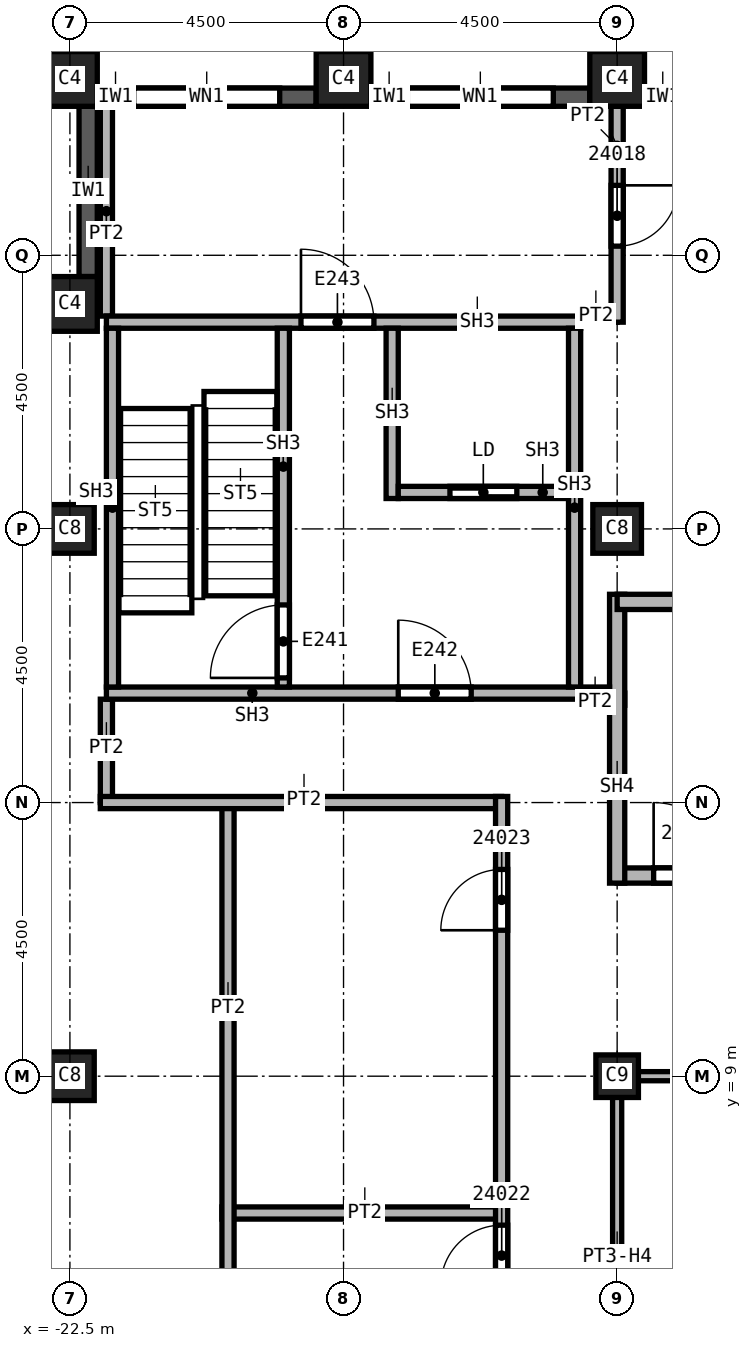
"""IFC4 building model, lengths in metres.
Left out: names, types, materials, properties, quantities, classifications, styles, units other than length and angle.
Written with IfcOpenShell. Run it as: python <this file> out.ifc"""

import sys

from ifc_helpers import new_model, si_unit, direction, frame, frame_2d, origin, origin_2d, place, context, subcontext, project, spatial, rectangle, extrude, element, fill, save


model = new_model("IFC4")
c1 = context("Model", 3, precision=1e-05, world=origin(), true_north=direction((0.0, 1.0)))
c2 = subcontext(c1, "Body", "Model", "MODEL_VIEW")
j1 = project(units=[si_unit("LENGTHUNIT", "METRE"), si_unit("PLANEANGLEUNIT", "RADIAN")], contexts=[c1])
p1 = place(None, origin())
s1 = spatial("IfcSite", under=j1, at=p1, CompositionType="ELEMENT")
p2 = place(p1, origin())
s2 = spatial("IfcBuilding", under=s1, at=p2, CompositionType="ELEMENT")
p3 = place(p2, frame((0.0, 0.0, 338.0)))
s3 = spatial("IfcBuildingStorey", under=s2, at=p3, CompositionType="ELEMENT", Elevation=338.0)
for number, where, z_axis, x_axis in (
    (1, (-13.5, 18.0, 0.0), (0.0, 0.0, 1.0), (1.0, 0.0, 0.0)),
    (2, (-22.5, 9.0, 0.0), (0.0, 0.0, 1.0), (1.0, 0.0, 0.0)),
    (3, (-22.5, 18.0, 0.0), (0.0, 0.0, 1.0), (1.0, 0.0, 0.0)),
):
    element("IfcColumn", number, at=place(p3, frame(where, z_axis=z_axis, x_axis=x_axis)), inside=s3, PredefinedType="COLUMN", context=c2, shape_type="SweptSolid", body=[
        extrude(rectangle(XDim=0.8, YDim=0.8, at=origin_2d()), origin(), (0.0, 0.0, 1.0), 3.74),
    ])
p4 = place(p3, frame((-13.5, 9.0, 0.0), z_axis=(0.0, 0.0, 1.0), x_axis=(1.0, 0.0, 0.0)))
e4 = element("IfcColumn", 4, at=p4, inside=s3, PredefinedType="COLUMN", context=c2, shape_type="SweptSolid", body=[
    extrude(rectangle(XDim=0.7, YDim=0.7, at=origin_2d()), origin(), (0.0, 0.0, 1.0), 3.74),
])
for number, where, z_axis, x_axis in (
    (5, (-13.5, 25.4, 0.0), (0.0, 0.0, 1.0), (1.0, 0.0, 0.0)),
    (6, (-18.0, 25.4, 0.0), (0.0, 0.0, 1.0), (1.0, 0.0, 0.0)),
    (7, (-22.5, 25.4, 0.0), (0.0, 0.0, 1.0), (1.0, 0.0, 0.0)),
    (8, (-22.5, 21.7, 0.0), (0.0, 0.0, 1.0), (1.0, 0.0, 0.0)),
):
    element("IfcColumn", number, at=place(p3, frame(where, z_axis=z_axis, x_axis=x_axis)), inside=s3, PredefinedType="COLUMN", context=c2, shape_type="SweptSolid", body=[
        extrude(rectangle(XDim=0.9, YDim=0.9, at=origin_2d()), origin(), (0.0, 0.0, 1.0), 3.74),
    ])
p5 = place(p3, frame((-9.45, 25.1, 0.0), z_axis=(0.0, 0.0, 1.0), x_axis=(-1.0, 0.0, 0.0)))
e9 = element("IfcWall", 9, at=p5, inside=s3, PredefinedType="SOLIDWALL", context=c2, shape_type="SweptSolid", body=[
    extrude(rectangle(XDim=3.6, YDim=0.3, at=frame_2d((1.8, 0.0))), origin(), (0.0, 0.0, 1.0), 3.14),
])
p6 = place(p5, frame((0.6, 0.0, 0.8)))
e10 = element("IfcOpeningElement", 10, at=p6, cuts=e9, PredefinedType="OPENING", context=c2, shape_type="SweptSolid", body=[
    extrude(rectangle(XDim=2.4, YDim=1.95, at=frame_2d((1.2, 0.975))), frame((0.0, 0.15, 0.0), z_axis=(0.0, -1.0, 0.0), x_axis=(1.0, 0.0, 0.0)), (0.0, 0.0, 1.0), 0.3),
])
p7 = place(p3, frame((-13.95, 25.1, 0.0), z_axis=(0.0, 0.0, 1.0), x_axis=(-1.0, 0.0, 0.0)))
e11 = element("IfcWall", 11, at=p7, inside=s3, PredefinedType="SOLIDWALL", context=c2, shape_type="SweptSolid", body=[
    extrude(rectangle(XDim=3.6, YDim=0.3, at=frame_2d((1.8, 0.0))), origin(), (0.0, 0.0, 1.0), 3.14),
])
p8 = place(p7, frame((0.6, 0.0, 0.8)))
e12 = element("IfcOpeningElement", 12, at=p8, cuts=e11, PredefinedType="OPENING", context=c2, shape_type="SweptSolid", body=[
    extrude(rectangle(XDim=2.4, YDim=1.95, at=frame_2d((1.2, 0.975))), frame((0.0, 0.15, 0.0), z_axis=(0.0, -1.0, 0.0), x_axis=(1.0, 0.0, 0.0)), (0.0, 0.0, 1.0), 0.3),
])
p9 = place(p3, frame((-18.45, 25.1, 0.0), z_axis=(0.0, 0.0, 1.0), x_axis=(-1.0, 0.0, 0.0)))
e13 = element("IfcWall", 13, at=p9, inside=s3, PredefinedType="SOLIDWALL", context=c2, shape_type="SweptSolid", body=[
    extrude(rectangle(XDim=3.6, YDim=0.3, at=frame_2d((1.8, 0.0))), origin(), (0.0, 0.0, 1.0), 3.14),
])
p10 = place(p9, frame((0.6, 0.0, 0.8)))
e14 = element("IfcOpeningElement", 14, at=p10, cuts=e13, PredefinedType="OPENING", context=c2, shape_type="SweptSolid", body=[
    extrude(rectangle(XDim=2.4, YDim=1.95, at=frame_2d((1.2, 0.975))), frame((0.0, 0.15, 0.0), z_axis=(0.0, -1.0, 0.0), x_axis=(1.0, 0.0, 0.0)), (0.0, 0.0, 1.0), 0.3),
])
p11 = place(p3, frame((-22.2, 24.95, 0.0), z_axis=(0.0, 0.0, 1.0), x_axis=(0.0, -1.0, 0.0)))
e15 = element("IfcWall", 15, at=p11, inside=s3, PredefinedType="SOLIDWALL", context=c2, shape_type="SweptSolid", body=[
    extrude(rectangle(XDim=2.8, YDim=0.3, at=frame_2d((1.4, 0.0))), origin(), (0.0, 0.0, 1.0), 3.14),
])
p12 = place(p3, frame((-21.9, 13.5, 0.0), z_axis=(0.0, 0.0, 1.0), x_axis=(0.0, 1.0, 0.0)))
e16 = element("IfcWall", 16, at=p12, inside=s3, PredefinedType="PARTITIONING", context=c2, shape_type="SweptSolid", body=[
    extrude(rectangle(XDim=1.7, YDim=0.2, at=frame_2d((0.85, 0.0))), origin(), (0.0, 0.0, 1.0), 3.74),
])
p13 = place(p3, frame((-21.9, 21.5, 0.0), z_axis=(0.0, 0.0, 1.0), x_axis=(0.0, 1.0, 0.0)))
e17 = element("IfcWall", 17, at=p13, inside=s3, PredefinedType="PARTITIONING", context=c2, shape_type="SweptSolid", body=[
    extrude(rectangle(XDim=3.45, YDim=0.2, at=frame_2d((1.725, 0.0))), origin(), (0.0, 0.0, 1.0), 3.74),
])
p14 = place(p3, frame((-20.0, 6.75, 0.0), z_axis=(0.0, 0.0, 1.0), x_axis=(1.0, 0.0, 0.0)))
e18 = element("IfcWall", 18, at=p14, inside=s3, PredefinedType="PARTITIONING", context=c2, shape_type="SweptSolid", body=[
    extrude(rectangle(XDim=4.6, YDim=0.2, at=frame_2d((2.3, 0.0))), origin(), (0.0, 0.0, 1.0), 3.74),
])
p15 = place(p3, frame((-19.9, -0.1, 0.0), z_axis=(0.0, 0.0, 1.0), x_axis=(0.0, 1.0, 0.0)))
e19 = element("IfcWall", 19, at=p15, inside=s3, PredefinedType="PARTITIONING", context=c2, shape_type="SweptSolid", body=[
    extrude(rectangle(XDim=13.6, YDim=0.2, at=frame_2d((6.8, 0.0))), origin(), (0.0, 0.0, 1.0), 3.74),
])
p16 = place(p15, frame((3.85, 0.0, 0.0)))
e20 = element("IfcOpeningElement", 20, at=p16, cuts=e19, PredefinedType="OPENING", context=c2, shape_type="SweptSolid", body=[
    extrude(rectangle(XDim=1.0, YDim=2.1, at=frame_2d((0.5, 1.05))), frame((0.0, 0.1, 0.0), z_axis=(0.0, -1.0, 0.0), x_axis=(1.0, 0.0, 0.0)), (0.0, 0.0, 1.0), 0.2),
])
p17 = place(p3, frame((-15.4, 13.5, 0.0), z_axis=(0.0, 0.0, 1.0), x_axis=(-1.0, 0.0, 0.0)))
e21 = element("IfcWall", 21, at=p17, inside=s3, PredefinedType="PARTITIONING", context=c2, shape_type="SweptSolid", body=[
    extrude(rectangle(XDim=6.6, YDim=0.2, at=frame_2d((3.3, 0.0))), origin(), (0.0, 0.0, 1.0), 3.74),
])
p18 = place(p3, frame((-15.4, -24.95, 0.0), z_axis=(0.0, 0.0, 1.0), x_axis=(0.0, 1.0, 0.0)))
e22 = element("IfcWall", 22, at=p18, inside=s3, PredefinedType="PARTITIONING", context=c2, shape_type="SweptSolid", body=[
    extrude(rectangle(XDim=38.55, YDim=0.2, at=frame_2d((19.275, 0.0))), origin(), (0.0, 0.0, 1.0), 3.74),
])
p19 = place(p18, frame((30.5, 0.0, 0.0)))
e23 = element("IfcOpeningElement", 23, at=p19, cuts=e22, PredefinedType="OPENING", context=c2, shape_type="SweptSolid", body=[
    extrude(rectangle(XDim=1.0, YDim=2.1, at=frame_2d((0.5, 1.05))), frame((0.0, 0.1, 0.0), z_axis=(0.0, -1.0, 0.0), x_axis=(1.0, 0.0, 0.0)), (0.0, 0.0, 1.0), 0.2),
])
p20 = place(p18, frame((36.35, 0.0, 0.0)))
e24 = element("IfcOpeningElement", 24, at=p20, cuts=e22, PredefinedType="OPENING", context=c2, shape_type="SweptSolid", body=[
    extrude(rectangle(XDim=1.0, YDim=2.1, at=frame_2d((0.5, 1.05))), frame((0.0, 0.1, 0.0), z_axis=(0.0, -1.0, 0.0), x_axis=(1.0, 0.0, 0.0)), (0.0, 0.0, 1.0), 0.2),
])
p21 = place(p18, frame((1.9, 0.0, 0.0)))
e25 = element("IfcOpeningElement", 25, at=p21, cuts=e22, PredefinedType="OPENING", context=c2, shape_type="SweptSolid", body=[
    extrude(rectangle(XDim=1.0, YDim=2.1, at=frame_2d((0.5, 1.05))), frame((0.0, 0.1, 0.0), z_axis=(0.0, -1.0, 0.0), x_axis=(1.0, 0.0, 0.0)), (0.0, 0.0, 1.0), 0.2),
])
p22 = place(p18, frame((5.6, 0.0, 0.0)))
e26 = element("IfcOpeningElement", 26, at=p22, cuts=e22, PredefinedType="OPENING", context=c2, shape_type="SweptSolid", body=[
    extrude(rectangle(XDim=1.0, YDim=2.1, at=frame_2d((0.5, 1.05))), frame((0.0, 0.1, 0.0), z_axis=(0.0, -1.0, 0.0), x_axis=(1.0, 0.0, 0.0)), (0.0, 0.0, 1.0), 0.2),
])
p23 = place(p18, frame((9.35, 0.0, 0.0)))
e27 = element("IfcOpeningElement", 27, at=p23, cuts=e22, PredefinedType="OPENING", context=c2, shape_type="SweptSolid", body=[
    extrude(rectangle(XDim=1.0, YDim=2.1, at=frame_2d((0.5, 1.05))), frame((0.0, 0.1, 0.0), z_axis=(0.0, -1.0, 0.0), x_axis=(1.0, 0.0, 0.0)), (0.0, 0.0, 1.0), 0.2),
])
p24 = place(p18, frame((16.1, 0.0, 0.0)))
e28 = element("IfcOpeningElement", 28, at=p24, cuts=e22, PredefinedType="OPENING", context=c2, shape_type="SweptSolid", body=[
    extrude(rectangle(XDim=1.0, YDim=2.1, at=frame_2d((0.5, 1.05))), frame((0.0, 0.1, 0.0), z_axis=(0.0, -1.0, 0.0), x_axis=(1.0, 0.0, 0.0)), (0.0, 0.0, 1.0), 0.2),
])
p25 = place(p3, frame((-14.1, 15.2, 0.0), z_axis=(0.0, 0.0, 1.0), x_axis=(1.0, 0.0, 0.0)))
e29 = element("IfcWall", 29, at=p25, inside=s3, PredefinedType="PARTITIONING", context=c2, shape_type="SweptSolid", body=[
    extrude(rectangle(XDim=0.725, YDim=0.2, at=frame_2d((0.363, 0.0))), origin(), (0.0, 0.0, 1.0), 3.74),
])
p26 = place(p3, frame((-13.5, 21.5, 0.0), z_axis=(0.0, 0.0, 1.0), x_axis=(-1.0, 0.0, 0.0)))
e30 = element("IfcWall", 30, at=p26, inside=s3, PredefinedType="PARTITIONING", context=c2, shape_type="SweptSolid", body=[
    extrude(rectangle(XDim=0.6, YDim=0.2, at=frame_2d((0.3, 0.0))), origin(), (0.0, 0.0, 1.0), 3.74),
])
p27 = place(p3, frame((-13.5, 24.95, 0.0), z_axis=(0.0, 0.0, 1.0), x_axis=(0.0, -1.0, 0.0)))
e31 = element("IfcWall", 31, at=p27, inside=s3, PredefinedType="PARTITIONING", context=c2, shape_type="SweptSolid", body=[
    extrude(rectangle(XDim=3.55, YDim=0.2, at=frame_2d((1.775, 0.0))), origin(), (0.0, 0.0, 1.0), 3.74),
])
p28 = place(p27, frame((1.3, 0.0, 0.0)))
e32 = element("IfcOpeningElement", 32, at=p28, cuts=e31, PredefinedType="OPENING", context=c2, shape_type="SweptSolid", body=[
    extrude(rectangle(XDim=1.0, YDim=2.1, at=frame_2d((0.5, 1.05))), frame((0.0, 0.1, 0.0), z_axis=(0.0, -1.0, 0.0), x_axis=(1.0, 0.0, 0.0)), (0.0, 0.0, 1.0), 0.2),
])
p29 = place(p3, frame((-13.5, 12.3, 0.0), z_axis=(0.0, 0.0, 1.0), x_axis=(1.0, 0.0, 0.0)))
e33 = element("IfcWall", 33, at=p29, inside=s3, PredefinedType="SOLIDWALL", context=c2, shape_type="SweptSolid", body=[
    extrude(rectangle(XDim=9.125, YDim=0.25, at=frame_2d((4.562, 0.0))), origin(), (0.0, 0.0, 1.0), 3.74),
])
p30 = place(p29, frame((0.6, 0.0, 0.0)))
e34 = element("IfcOpeningElement", 34, at=p30, cuts=e33, PredefinedType="OPENING", context=c2, shape_type="SweptSolid", body=[
    extrude(rectangle(XDim=1.2, YDim=2.1, at=frame_2d((0.6, 1.05))), frame((0.0, 0.125, 0.0), z_axis=(0.0, -1.0, 0.0), x_axis=(1.0, 0.0, 0.0)), (0.0, 0.0, 1.0), 0.25),
])
p31 = place(p3, frame((-13.5, 12.175, 0.0), z_axis=(0.0, 0.0, 1.0), x_axis=(0.0, 1.0, 0.0)))
e35 = element("IfcWall", 35, at=p31, inside=s3, PredefinedType="SOLIDWALL", context=c2, shape_type="SweptSolid", body=[
    extrude(rectangle(XDim=4.75, YDim=0.25, at=frame_2d((2.375, 0.0))), origin(), (0.0, 0.0, 1.0), 3.74),
])
p32 = place(p3, frame((-13.5, 16.8, 0.0), z_axis=(0.0, 0.0, 1.0), x_axis=(1.0, 0.0, 0.0)))
e36 = element("IfcWall", 36, at=p32, inside=s3, PredefinedType="SOLIDWALL", context=c2, shape_type="SweptSolid", body=[
    extrude(rectangle(XDim=9.125, YDim=0.25, at=frame_2d((4.562, 0.0))), origin(), (0.0, 0.0, 1.0), 3.74),
])
p33 = place(p3, frame((-13.5, 3.0, 0.0), z_axis=(0.0, 0.0, 1.0), x_axis=(0.0, 1.0, 0.0)))
e37 = element("IfcWall", 37, at=p33, inside=s3, PredefinedType="PARTITIONING", context=c2, shape_type="SweptSolid", body=[
    extrude(rectangle(XDim=6.075, YDim=0.15, at=frame_2d((3.038, 0.0))), origin(), (0.0, 0.0, 1.0), 3.062),
])
p34 = place(p3, frame((-13.5, 9.0, 0.0), z_axis=(0.0, 0.0, 1.0), x_axis=(1.0, 0.0, 0.0)))
e38 = element("IfcWall", 38, at=p34, inside=s3, PredefinedType="PARTITIONING", context=c2, shape_type="SweptSolid", body=[
    extrude(rectangle(XDim=3.0, YDim=0.15, at=frame_2d((1.5, 0.0))), origin(), (0.0, 0.0, 1.0), 3.062),
])
p35 = place(p3, frame((-21.9, 15.3, 0.0), z_axis=(0.0, 0.0, 1.0), x_axis=(1.0, 0.0, 0.0)))
e39 = element("IfcWall", 39, at=p35, inside=s3, PredefinedType="SOLIDWALL", context=c2, shape_type="SweptSolid", body=[
    extrude(rectangle(XDim=8.275, YDim=0.2, at=frame_2d((4.137, 0.0))), origin(), (0.0, 0.0, 1.0), 3.74),
])
p36 = place(p35, frame((4.8, 0.0, 0.0)))
e40 = element("IfcOpeningElement", 40, at=p36, cuts=e39, PredefinedType="OPENING", context=c2, shape_type="SweptSolid", body=[
    extrude(rectangle(XDim=1.2, YDim=2.1, at=frame_2d((0.6, 1.05))), frame((0.0, 0.1, 0.0), z_axis=(0.0, -1.0, 0.0), x_axis=(1.0, 0.0, 0.0)), (0.0, 0.0, 1.0), 0.2),
])
p37 = place(p3, frame((-21.9, 21.4, 0.0), z_axis=(0.0, 0.0, 1.0), x_axis=(1.0, 0.0, 0.0)))
e41 = element("IfcWall", 41, at=p37, inside=s3, PredefinedType="SOLIDWALL", context=c2, shape_type="SweptSolid", body=[
    extrude(rectangle(XDim=7.8, YDim=0.2, at=frame_2d((3.9, 0.0))), origin(), (0.0, 0.0, 1.0), 3.74),
])
p38 = place(p37, frame((3.2, 0.0, 0.0)))
e42 = element("IfcOpeningElement", 42, at=p38, cuts=e41, PredefinedType="OPENING", context=c2, shape_type="SweptSolid", body=[
    extrude(rectangle(XDim=1.2, YDim=2.1, at=frame_2d((0.6, 1.05))), frame((0.0, 0.1, 0.0), z_axis=(0.0, -1.0, 0.0), x_axis=(1.0, 0.0, 0.0)), (0.0, 0.0, 1.0), 0.2),
])
for number, where, z_axis, x_axis in (
    (43, (-21.8, 15.4, 0.0), (0.0, 0.0, 1.0), (0.0, 1.0, 0.0)),
    (44, (-14.2, 15.4, 0.0), (0.0, 0.0, 1.0), (0.0, 1.0, 0.0)),
):
    element("IfcWall", number, at=place(p3, frame(where, z_axis=z_axis, x_axis=x_axis)), inside=s3, PredefinedType="SOLIDWALL", context=c2, shape_type="SweptSolid", body=[
        extrude(rectangle(XDim=5.9, YDim=0.2, at=frame_2d((2.95, 0.0))), origin(), (0.0, 0.0, 1.0), 3.74),
    ])
p39 = place(p3, frame((-18.99, 15.4, 0.0), z_axis=(0.0, 0.0, 1.0), x_axis=(0.0, 1.0, 0.0)))
e45 = element("IfcWall", 45, at=p39, inside=s3, PredefinedType="SOLIDWALL", context=c2, shape_type="SweptSolid", body=[
    extrude(rectangle(XDim=5.9, YDim=0.2, at=frame_2d((2.95, 0.0))), origin(), (0.0, 0.0, 1.0), 3.74),
])
p40 = place(p39, frame((0.15, 0.0, 0.0)))
e46 = element("IfcOpeningElement", 46, at=p40, cuts=e45, PredefinedType="OPENING", context=c2, shape_type="SweptSolid", body=[
    extrude(rectangle(XDim=1.2, YDim=2.1, at=frame_2d((0.6, 1.05))), frame((0.0, 0.1, 0.0), z_axis=(0.0, -1.0, 0.0), x_axis=(1.0, 0.0, 0.0)), (0.0, 0.0, 1.0), 0.2),
])
p41 = place(p3, frame((-17.2, 18.5, 0.0), z_axis=(0.0, 0.0, 1.0), x_axis=(0.0, 1.0, 0.0)))
e47 = element("IfcWall", 47, at=p41, inside=s3, PredefinedType="SOLIDWALL", context=c2, shape_type="SweptSolid", body=[
    extrude(rectangle(XDim=2.8, YDim=0.2, at=frame_2d((1.4, 0.0))), origin(), (0.0, 0.0, 1.0), 3.74),
])
p42 = place(p3, frame((-17.1, 18.6, 0.0), z_axis=(0.0, 0.0, 1.0), x_axis=(1.0, 0.0, 0.0)))
e48 = element("IfcWall", 48, at=p42, inside=s3, PredefinedType="SOLIDWALL", context=c2, shape_type="SweptSolid", body=[
    extrude(rectangle(XDim=2.8, YDim=0.2, at=frame_2d((1.4, 0.0))), origin(), (0.0, 0.0, 1.0), 3.74),
])
p43 = place(p42, frame((0.85, 0.0, 0.0)))
e49 = element("IfcOpeningElement", 49, at=p43, cuts=e48, PredefinedType="OPENING", context=c2, shape_type="SweptSolid", body=[
    extrude(rectangle(XDim=1.1, YDim=2.1, at=frame_2d((0.55, 1.05))), frame((0.0, 0.1, 0.0), z_axis=(0.0, -1.0, 0.0), x_axis=(1.0, 0.0, 0.0)), (0.0, 0.0, 1.0), 0.2),
])
p44 = place(p8, origin())
e50 = element("IfcWindow", 50, at=p44, inside=s3, PartitioningType="SINGLE_PANEL", PredefinedType="WINDOW", context=c2, shape_type="SweptSolid", body=[
    extrude(rectangle(XDim=2.4, YDim=1.95, at=frame_2d((1.2, 0.975))), frame((0.0, 0.03, 0.0), z_axis=(0.0, -1.0, 0.0), x_axis=(1.0, 0.0, 0.0)), (0.0, 0.0, 1.0), 0.06),
])
fill(e12, e50)
p45 = place(p10, origin())
e51 = element("IfcWindow", 51, at=p45, inside=s3, PartitioningType="SINGLE_PANEL", PredefinedType="WINDOW", context=c2, shape_type="SweptSolid", body=[
    extrude(rectangle(XDim=2.4, YDim=1.95, at=frame_2d((1.2, 0.975))), frame((0.0, 0.03, 0.0), z_axis=(0.0, -1.0, 0.0), x_axis=(1.0, 0.0, 0.0)), (0.0, 0.0, 1.0), 0.06),
])
fill(e14, e51)
p46 = place(p30, origin())
e52 = element("IfcDoor", 52, at=p46, inside=s3, OperationType="SINGLE_SWING_LEFT", PredefinedType="DOOR", context=c2, shape_type="SweptSolid", body=[
    extrude(rectangle(XDim=1.2, YDim=2.1, at=frame_2d((0.6, 1.05))), frame((0.0, 0.025, 0.0), z_axis=(0.0, -1.0, 0.0), x_axis=(1.0, 0.0, 0.0)), (0.0, 0.0, 1.0), 0.05),
])
fill(e34, e52)
p47 = place(p28, origin())
e53 = element("IfcDoor", 53, at=p47, inside=s3, OperationType="SINGLE_SWING_LEFT", PredefinedType="DOOR", context=c2, shape_type="SweptSolid", body=[
    extrude(rectangle(XDim=1.0, YDim=2.1, at=frame_2d((0.5, 1.05))), frame((0.0, 0.025, 0.0), z_axis=(0.0, -1.0, 0.0), x_axis=(1.0, 0.0, 0.0)), (0.0, 0.0, 1.0), 0.05),
])
fill(e32, e53)
p48 = place(p19, origin())
e54 = element("IfcDoor", 54, at=p48, inside=s3, OperationType="SINGLE_SWING_LEFT", PredefinedType="DOOR", context=c2, shape_type="SweptSolid", body=[
    extrude(rectangle(XDim=1.0, YDim=2.1, at=frame_2d((0.5, 1.05))), frame((0.0, 0.025, 0.0), z_axis=(0.0, -1.0, 0.0), x_axis=(1.0, 0.0, 0.0)), (0.0, 0.0, 1.0), 0.05),
])
fill(e23, e54)
p49 = place(p20, origin())
e55 = element("IfcDoor", 55, at=p49, inside=s3, OperationType="SINGLE_SWING_RIGHT", PredefinedType="DOOR", context=c2, shape_type="SweptSolid", body=[
    extrude(rectangle(XDim=1.0, YDim=2.1, at=frame_2d((0.5, 1.05))), frame((0.0, 0.025, 0.0), z_axis=(0.0, -1.0, 0.0), x_axis=(1.0, 0.0, 0.0)), (0.0, 0.0, 1.0), 0.05),
])
fill(e24, e55)
p50 = place(p40, origin())
e56 = element("IfcDoor", 56, at=p50, inside=s3, OperationType="SINGLE_SWING_LEFT", PredefinedType="DOOR", context=c2, shape_type="SweptSolid", body=[
    extrude(rectangle(XDim=1.2, YDim=2.1, at=frame_2d((0.6, 1.05))), frame((0.0, 0.025, 0.0), z_axis=(0.0, -1.0, 0.0), x_axis=(1.0, 0.0, 0.0)), (0.0, 0.0, 1.0), 0.05),
])
fill(e46, e56)
p51 = place(p43, origin())
e57 = element("IfcDoor", 57, at=p51, inside=s3, OperationType="SLIDING_TO_LEFT", PredefinedType="DOOR", context=c2, shape_type="SweptSolid", body=[
    extrude(rectangle(XDim=1.1, YDim=2.1, at=frame_2d((0.55, 1.05))), frame((0.0, 0.025, 0.0), z_axis=(0.0, -1.0, 0.0), x_axis=(1.0, 0.0, 0.0)), (0.0, 0.0, 1.0), 0.05),
])
fill(e49, e57)
p52 = place(p36, origin())
e58 = element("IfcDoor", 58, at=p52, inside=s3, OperationType="SINGLE_SWING_RIGHT", PredefinedType="DOOR", context=c2, shape_type="SweptSolid", body=[
    extrude(rectangle(XDim=1.2, YDim=2.1, at=frame_2d((0.6, 1.05))), frame((0.0, 0.025, 0.0), z_axis=(0.0, -1.0, 0.0), x_axis=(1.0, 0.0, 0.0)), (0.0, 0.0, 1.0), 0.05),
])
fill(e40, e58)
p53 = place(p38, origin())
e59 = element("IfcDoor", 59, at=p53, inside=s3, OperationType="SINGLE_SWING_LEFT", PredefinedType="DOOR", context=c2, shape_type="SweptSolid", body=[
    extrude(rectangle(XDim=1.2, YDim=2.1, at=frame_2d((0.6, 1.05))), frame((0.0, 0.025, 0.0), z_axis=(0.0, -1.0, 0.0), x_axis=(1.0, 0.0, 0.0)), (0.0, 0.0, 1.0), 0.05),
])
fill(e42, e59)
save(model, sys.argv[1])
